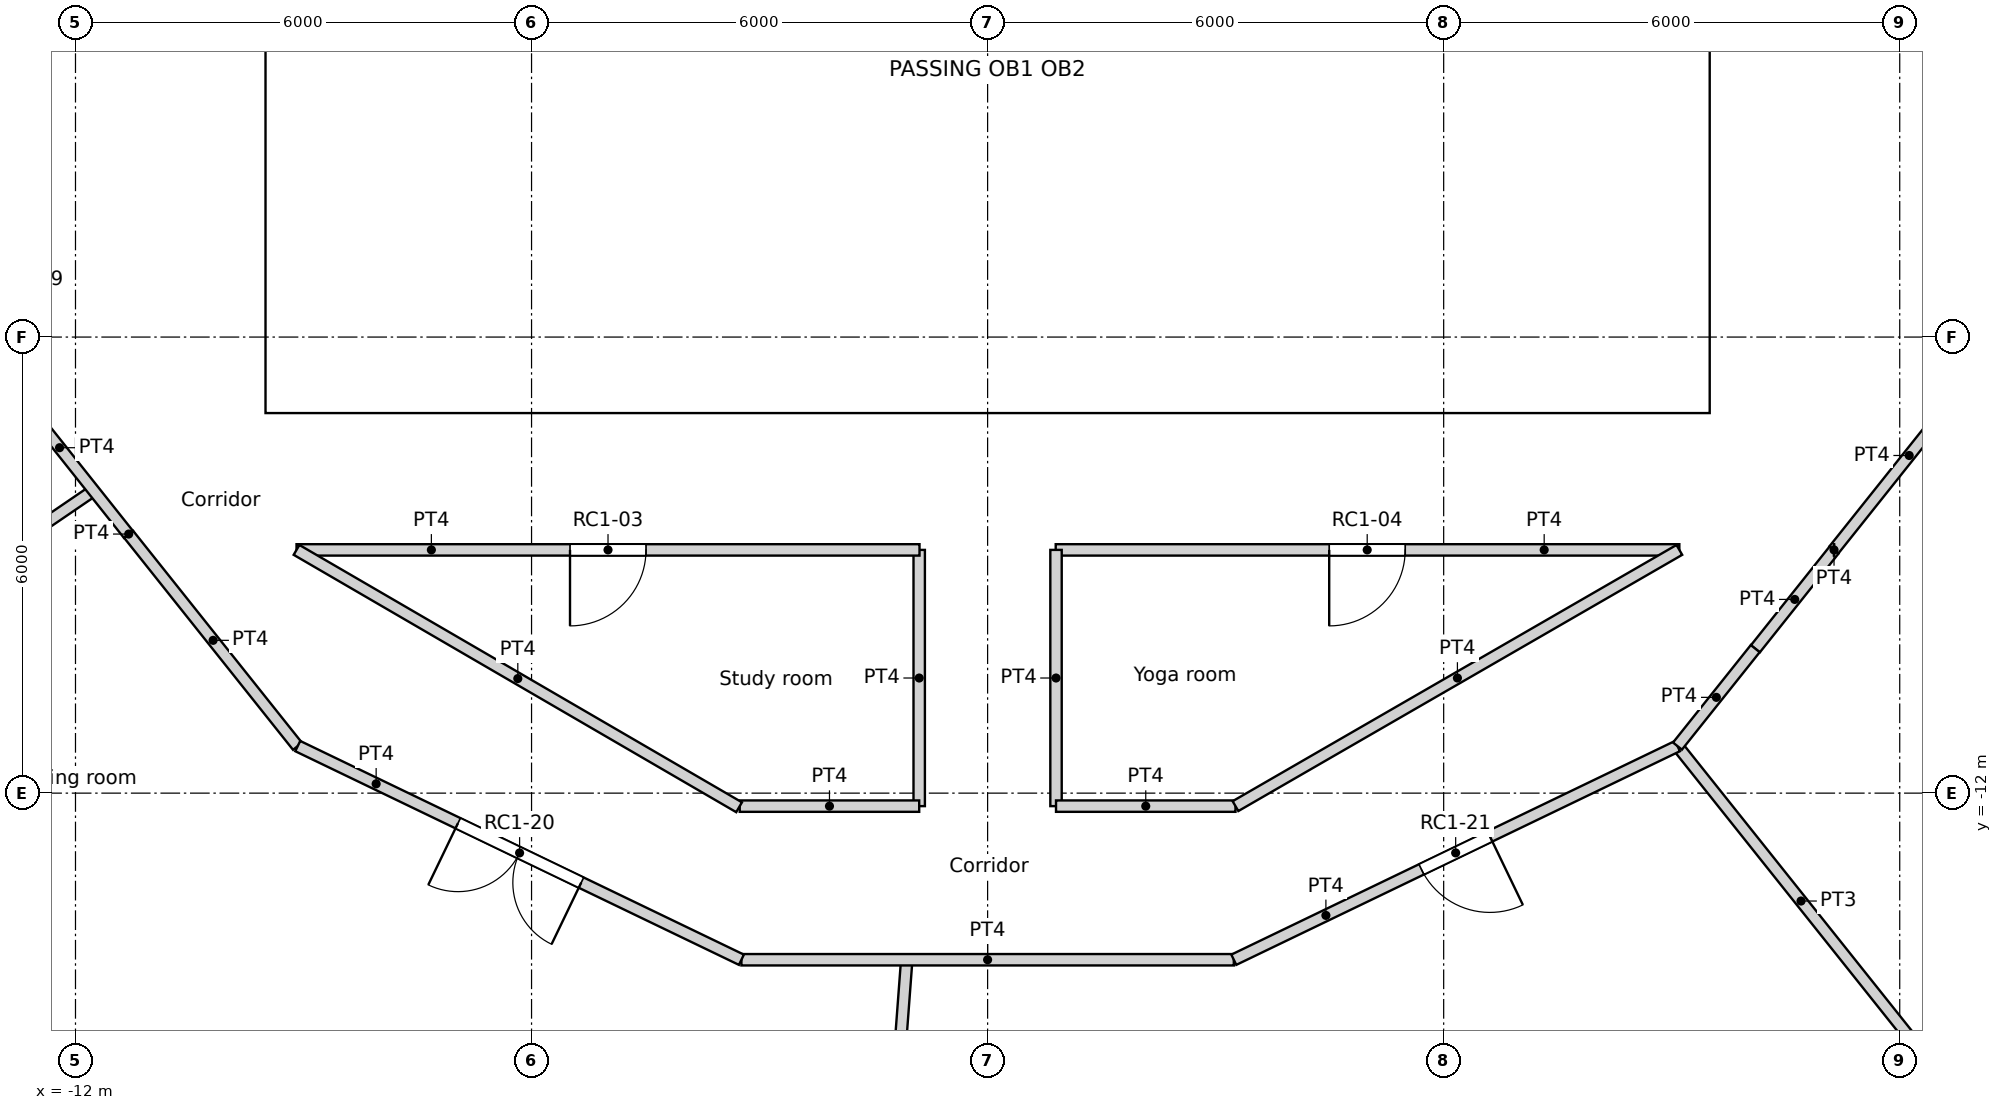
"""IFC4 building model, lengths in metres.
Left out: names, types, materials, properties, quantities, classifications, styles, units other than length and angle.
Written with IfcOpenShell. Run it as: python <this file> out.ifc"""

import sys

from ifc_helpers import new_model, si_unit, direction, frame, frame_2d, origin, origin_2d, place, context, subcontext, project, spatial, rectangle, circle, extrude, element, fill, save


model = new_model("IFC4")
c1 = context("Model", 3, precision=1e-05, world=origin(), true_north=direction((0.0, 1.0)))
c2 = subcontext(c1, "Body", "Model", "MODEL_VIEW")
j1 = project(units=[si_unit("LENGTHUNIT", "METRE"), si_unit("PLANEANGLEUNIT", "RADIAN")], contexts=[c1])
p1 = place(None, origin())
s1 = spatial("IfcSite", under=j1, at=p1, CompositionType="ELEMENT")
p2 = place(p1, origin())
s2 = spatial("IfcBuilding", under=s1, at=p2, CompositionType="ELEMENT")
p3 = place(p2, frame((0.0, 0.0, 231.0)))
s3 = spatial("IfcBuildingStorey", under=s2, at=p3, CompositionType="ELEMENT", Elevation=231.0)
p4 = place(p3, frame((11.735, -14.716, 0.0), z_axis=(0.0, 0.0, 1.0), x_axis=(1.0, 0.0, 0.0)))
e1 = element("IfcColumn", 1, at=p4, inside=s3, PredefinedType="COLUMN", context=c2, shape_type="SweptSolid", body=[
    extrude(circle(Radius=0.55, at=origin_2d()), origin(), (0.0, 0.0, 1.0), 3.6),
])
p5 = place(p3, frame((-9.5, -6.7, 0.0), z_axis=(0.0, 0.0, 1.0), x_axis=(1.0, 0.0, 0.0)))
e2 = element("IfcWall", 2, at=p5, inside=s3, PredefinedType="SOLIDWALL", context=c2, shape_type="SweptSolid", body=[
    extrude(rectangle(XDim=19.0, YDim=0.6, at=frame_2d((9.5, 0.0))), origin(), (0.0, 0.0, 1.0), 3.6),
])
p6 = place(p5, frame((10.4, 0.0, 0.0)))
e3 = element("IfcOpeningElement", 3, at=p6, cuts=e2, PredefinedType="OPENING", context=c2, shape_type="SweptSolid", body=[
    extrude(rectangle(XDim=1.0, YDim=2.1, at=frame_2d((0.5, 1.05))), frame((0.0, 0.3, 0.0), z_axis=(0.0, -1.0, 0.0), x_axis=(1.0, 0.0, 0.0)), (0.0, 0.0, 1.0), 0.6),
])
p7 = place(p5, frame((5.35, 0.0, 0.0)))
e4 = element("IfcOpeningElement", 4, at=p7, cuts=e2, PredefinedType="OPENING", context=c2, shape_type="SweptSolid", body=[
    extrude(rectangle(XDim=1.7, YDim=2.1, at=frame_2d((0.85, 1.05))), frame((0.0, 0.3, 0.0), z_axis=(0.0, -1.0, 0.0), x_axis=(1.0, 0.0, 0.0)), (0.0, 0.0, 1.0), 0.6),
])
p8 = place(p5, frame((11.95, 0.0, 0.0)))
e5 = element("IfcOpeningElement", 5, at=p8, cuts=e2, PredefinedType="OPENING", context=c2, shape_type="SweptSolid", body=[
    extrude(rectangle(XDim=1.7, YDim=2.1, at=frame_2d((0.85, 1.05))), frame((0.0, 0.3, 0.0), z_axis=(0.0, -1.0, 0.0), x_axis=(1.0, 0.0, 0.0)), (0.0, 0.0, 1.0), 0.6),
])
p9 = place(p3, frame((-9.2, -6.4, 0.0), z_axis=(0.0, 0.0, 1.0), x_axis=(0.0, 1.0, 0.0)))
e6 = element("IfcWall", 6, at=p9, inside=s3, PredefinedType="SOLIDWALL", context=c2, shape_type="SweptSolid", body=[
    extrude(rectangle(XDim=12.8, YDim=0.6, at=frame_2d((6.4, 0.0))), origin(), (0.0, 0.0, 1.0), 3.6),
])
p10 = place(p3, frame((9.2, -6.4, 0.0), z_axis=(0.0, 0.0, 1.0), x_axis=(0.0, 1.0, 0.0)))
e7 = element("IfcWall", 7, at=p10, inside=s3, PredefinedType="SOLIDWALL", context=c2, shape_type="SweptSolid", body=[
    extrude(rectangle(XDim=12.8, YDim=0.6, at=frame_2d((6.4, 0.0))), origin(), (0.0, 0.0, 1.0), 3.6),
])
p11 = place(p10, frame((6.4, 0.0, 0.0)))
e8 = element("IfcOpeningElement", 8, at=p11, cuts=e7, PredefinedType="OPENING", context=c2, shape_type="SweptSolid", body=[
    extrude(rectangle(XDim=1.8, YDim=2.1, at=frame_2d((0.9, 1.05))), frame((0.0, 0.3, 0.0), z_axis=(0.0, -1.0, 0.0), x_axis=(1.0, 0.0, 0.0)), (0.0, 0.0, 1.0), 0.6),
])
p12 = place(p3, frame((-8.9, -3.1, 0.0), z_axis=(0.0, 0.0, 1.0), x_axis=(1.0, 0.0, 0.0)))
e9 = element("IfcWall", 9, at=p12, inside=s3, PredefinedType="SOLIDWALL", context=c2, shape_type="SweptSolid", body=[
    extrude(rectangle(XDim=9.6, YDim=0.3, at=frame_2d((4.8, 0.0))), origin(), (0.0, 0.0, 1.0), 3.25),
])
p13 = place(p12, frame((4.75, 0.0, 0.0)))
e10 = element("IfcOpeningElement", 10, at=p13, cuts=e9, PredefinedType="OPENING", context=c2, shape_type="SweptSolid", body=[
    extrude(rectangle(XDim=1.7, YDim=2.1, at=frame_2d((0.85, 1.05))), frame((0.0, 0.15, 0.0), z_axis=(0.0, -1.0, 0.0), x_axis=(1.0, 0.0, 0.0)), (0.0, 0.0, 1.0), 0.3),
])
p14 = place(p3, frame((2.1, -3.1, 0.0), z_axis=(0.0, 0.0, 1.0), x_axis=(1.0, 0.0, 0.0)))
e11 = element("IfcWall", 11, at=p14, inside=s3, PredefinedType="SOLIDWALL", context=c2, shape_type="SweptSolid", body=[
    extrude(rectangle(XDim=6.8, YDim=0.3, at=frame_2d((3.4, 0.0))), origin(), (0.0, 0.0, 1.0), 3.25),
])
p15 = place(p14, frame((0.35, 0.0, 0.0)))
e12 = element("IfcOpeningElement", 12, at=p15, cuts=e11, PredefinedType="OPENING", context=c2, shape_type="SweptSolid", body=[
    extrude(rectangle(XDim=1.7, YDim=2.1, at=frame_2d((0.85, 1.05))), frame((0.0, 0.15, 0.0), z_axis=(0.0, -1.0, 0.0), x_axis=(1.0, 0.0, 0.0)), (0.0, 0.0, 1.0), 0.3),
])
p16 = place(p3, frame((-5.75, -2.95, 0.0), z_axis=(0.0, 0.0, 1.0), x_axis=(0.0, 1.0, 0.0)))
e13 = element("IfcWall", 13, at=p16, inside=s3, PredefinedType="SOLIDWALL", context=c2, shape_type="SweptSolid", body=[
    extrude(rectangle(XDim=5.9, YDim=0.3, at=frame_2d((2.95, 0.0))), origin(), (0.0, 0.0, 1.0), 3.25),
])
p17 = place(p16, frame((0.75, 0.0, 0.0)))
e14 = element("IfcOpeningElement", 14, at=p17, cuts=e13, PredefinedType="OPENING", context=c2, shape_type="SweptSolid", body=[
    extrude(rectangle(XDim=1.3, YDim=2.1, at=frame_2d((0.65, 1.05))), frame((0.0, 0.15, 0.0), z_axis=(0.0, -1.0, 0.0), x_axis=(1.0, 0.0, 0.0)), (0.0, 0.0, 1.0), 0.3),
])
p18 = place(p16, frame((3.85, 0.0, 0.0)))
e15 = element("IfcOpeningElement", 15, at=p18, cuts=e13, PredefinedType="OPENING", context=c2, shape_type="SweptSolid", body=[
    extrude(rectangle(XDim=1.3, YDim=2.1, at=frame_2d((0.65, 1.05))), frame((0.0, 0.15, 0.0), z_axis=(0.0, -1.0, 0.0), x_axis=(1.0, 0.0, 0.0)), (0.0, 0.0, 1.0), 0.3),
])
p19 = place(p3, frame((-2.25, -2.95, 0.0), z_axis=(0.0, 0.0, 1.0), x_axis=(0.0, 1.0, 0.0)))
e16 = element("IfcWall", 16, at=p19, inside=s3, PredefinedType="SOLIDWALL", context=c2, shape_type="SweptSolid", body=[
    extrude(rectangle(XDim=5.9, YDim=0.15, at=frame_2d((2.95, 0.0))), origin(), (0.0, 0.0, 1.0), 3.25),
])
p20 = place(p19, frame((2.25, 0.0, 0.0)))
e17 = element("IfcOpeningElement", 17, at=p20, cuts=e16, PredefinedType="OPENING", context=c2, shape_type="SweptSolid", body=[
    extrude(rectangle(XDim=1.4, YDim=2.1, at=frame_2d((0.7, 1.05))), frame((0.0, 0.075, 0.0), z_axis=(0.0, -1.0, 0.0), x_axis=(1.0, 0.0, 0.0)), (0.0, 0.0, 1.0), 0.15),
])
for number, where, z_axis, x_axis in (
    (18, (-2.25, -6.4, 0.0), (0.0, 0.0, 1.0), (0.0, 1.0, 0.0)),
    (19, (0.55, -6.4, 0.0), (0.0, 0.0, 1.0), (0.0, 1.0, 0.0)),
    (20, (2.25, -6.4, 0.0), (0.0, 0.0, 1.0), (0.0, 1.0, 0.0)),
):
    element("IfcWall", number, at=place(p3, frame(where, z_axis=z_axis, x_axis=x_axis)), inside=s3, PredefinedType="SOLIDWALL", context=c2, shape_type="SweptSolid", body=[
        extrude(rectangle(XDim=3.15, YDim=0.3, at=frame_2d((1.575, 0.0))), origin(), (0.0, 0.0, 1.0), 3.25),
    ])
for number, where, z_axis, x_axis in (
    (21, (4.3, -2.95, 0.0), (0.0, 0.0, 1.0), (0.0, 1.0, 0.0)),
    (22, (5.675, -2.95, 0.0), (0.0, 0.0, 1.0), (0.0, 1.0, 0.0)),
    (23, (7.125, -2.95, 0.0), (0.0, 0.0, 1.0), (0.0, 1.0, 0.0)),
):
    element("IfcWall", number, at=place(p3, frame(where, z_axis=z_axis, x_axis=x_axis)), inside=s3, PredefinedType="SOLIDWALL", context=c2, shape_type="SweptSolid", body=[
        extrude(rectangle(XDim=2.45, YDim=0.15, at=frame_2d((1.225, 0.0))), origin(), (0.0, 0.0, 1.0), 3.25),
    ])
p21 = place(p3, frame((-9.092, -8.8, 0.0), z_axis=(0.0, 0.0, 1.0), x_axis=(1.0, 0.0, 0.0)))
e24 = element("IfcWall", 24, at=p21, inside=s3, PredefinedType="PARTITIONING", context=c2, shape_type="SweptSolid", body=[
    extrude(rectangle(XDim=8.196, YDim=0.15, at=frame_2d((4.098, 0.0))), origin(), (0.0, 0.0, 1.0), 3.25),
])
p22 = place(p21, frame((3.598, 0.0, 0.0)))
e25 = element("IfcOpeningElement", 25, at=p22, cuts=e24, PredefinedType="OPENING", context=c2, shape_type="SweptSolid", body=[
    extrude(rectangle(XDim=1.0, YDim=2.04, at=frame_2d((0.5, 1.02))), frame((0.0, 0.075, 0.0), z_axis=(0.0, -1.0, 0.0), x_axis=(1.0, 0.0, 0.0)), (0.0, 0.0, 1.0), 0.15),
])
p23 = place(p3, frame((-9.092, -8.8, 0.0), z_axis=(0.0, 0.0, 1.0), x_axis=(0.864470922103, -0.502682827277, 0.0)))
e26 = element("IfcWall", 26, at=p23, inside=s3, PredefinedType="PARTITIONING", context=c2, shape_type="SweptSolid", body=[
    extrude(rectangle(XDim=6.735, YDim=0.15, at=frame_2d((3.368, 0.0))), origin(), (0.0, 0.0, 1.0), 3.25),
])
p24 = place(p3, frame((0.896, -8.8, 0.0), z_axis=(0.0, 0.0, 1.0), x_axis=(1.0, 0.0, 0.0)))
e27 = element("IfcWall", 27, at=p24, inside=s3, PredefinedType="PARTITIONING", context=c2, shape_type="SweptSolid", body=[
    extrude(rectangle(XDim=8.205, YDim=0.15, at=frame_2d((4.102, 0.0))), origin(), (0.0, 0.0, 1.0), 3.25),
])
p25 = place(p24, frame((3.598, 0.0, 0.0)))
e28 = element("IfcOpeningElement", 28, at=p25, cuts=e27, PredefinedType="OPENING", context=c2, shape_type="SweptSolid", body=[
    extrude(rectangle(XDim=1.0, YDim=2.04, at=frame_2d((0.5, 1.02))), frame((0.0, 0.075, 0.0), z_axis=(0.0, -1.0, 0.0), x_axis=(1.0, 0.0, 0.0)), (0.0, 0.0, 1.0), 0.15),
])
p26 = place(p3, frame((-11.3, -8.596, 0.0), z_axis=(0.0, 0.0, 1.0), x_axis=(0.623165080354, -0.782090328944, 0.0)))
e29 = element("IfcWall", 29, at=p26, inside=s3, PredefinedType="PARTITIONING", context=c2, shape_type="SweptSolid", body=[
    extrude(rectangle(XDim=3.564, YDim=0.15, at=frame_2d((1.782, 0.0))), origin(), (0.0, 0.0, 1.0), 3.25),
])
p27 = place(p3, frame((-11.3, -8.596, 0.0), z_axis=(0.0, 0.0, 1.0), x_axis=(0.0, 1.0, 0.0)))
e30 = element("IfcWall", 30, at=p27, inside=s3, PredefinedType="PARTITIONING", context=c2, shape_type="SweptSolid", body=[
    extrude(rectangle(XDim=0.009, YDim=0.15, at=frame_2d((0.005, 0.0))), origin(), (0.0, 0.0, 1.0), 3.25),
])
p28 = place(p3, frame((11.137, -8.8, 0.0), z_axis=(0.0, 0.0, 1.0), x_axis=(-1.0, 0.0, 0.0)))
e31 = element("IfcWall", 31, at=p28, inside=s3, PredefinedType="PARTITIONING", context=c2, shape_type="SweptSolid", body=[
    extrude(rectangle(XDim=0.003, YDim=0.15, at=frame_2d((0.001, 0.0))), origin(), (0.0, 0.0, 1.0), 3.25),
])
p29 = place(p3, frame((10.101, -10.101, 0.0), z_axis=(0.0, 0.0, 1.0), x_axis=(0.623098344652, 0.782143498913, 0.0)))
e32 = element("IfcWall", 32, at=p29, inside=s3, PredefinedType="PARTITIONING", context=c2, shape_type="SweptSolid", body=[
    extrude(rectangle(XDim=1.661, YDim=0.15, at=frame_2d((0.831, 0.0))), origin(), (0.0, 0.0, 1.0), 3.25),
])
p30 = place(p3, frame((11.134, -8.8, 0.0), z_axis=(0.0, 0.0, 1.0), x_axis=(0.623476099415, 0.781842409606, 0.0)))
e33 = element("IfcWall", 33, at=p30, inside=s3, PredefinedType="PARTITIONING", context=c2, shape_type="SweptSolid", body=[
    extrude(rectangle(XDim=3.177, YDim=0.15, at=frame_2d((1.589, 0.0))), origin(), (0.0, 0.0, 1.0), 3.25),
])
p31 = place(p3, frame((-13.115, -6.316, 0.0), z_axis=(0.0, 0.0, 1.0), x_axis=(0.622042479172, -0.782983495423, 0.0)))
e34 = element("IfcWall", 34, at=p31, inside=s3, PredefinedType="PARTITIONING", context=c2, shape_type="SweptSolid", body=[
    extrude(rectangle(XDim=2.911, YDim=0.15, at=frame_2d((1.456, 0.0))), origin(), (0.0, 0.0, 1.0), 3.25),
])
p32 = place(p3, frame((-3.261, -12.171, 0.0), z_axis=(0.0, 0.0, 1.0), x_axis=(1.0, 0.0, 0.0)))
e35 = element("IfcWall", 35, at=p32, inside=s3, PredefinedType="PARTITIONING", context=c2, shape_type="SweptSolid", body=[
    extrude(rectangle(XDim=2.361, YDim=0.15, at=frame_2d((1.181, 0.0))), origin(), (0.0, 0.0, 1.0), 3.25),
])
for number, where, z_axis, x_axis in (
    (36, (-0.9, -12.171, 0.0), (0.0, 0.0, 1.0), (0.0, 1.0, 0.0)),
    (37, (0.9, -12.171, 0.0), (0.0, 0.0, 1.0), (0.0, 1.0, 0.0)),
):
    element("IfcWall", number, at=place(p3, frame(where, z_axis=z_axis, x_axis=x_axis)), inside=s3, PredefinedType="PARTITIONING", context=c2, shape_type="SweptSolid", body=[
        extrude(rectangle(XDim=3.371, YDim=0.15, at=frame_2d((1.686, 0.0))), origin(), (0.0, 0.0, 1.0), 3.25),
    ])
p33 = place(p3, frame((0.9, -12.171, 0.0), z_axis=(0.0, 0.0, 1.0), x_axis=(1.0, 0.0, 0.0)))
e38 = element("IfcWall", 38, at=p33, inside=s3, PredefinedType="PARTITIONING", context=c2, shape_type="SweptSolid", body=[
    extrude(rectangle(XDim=2.361, YDim=0.15, at=frame_2d((1.181, 0.0))), origin(), (0.0, 0.0, 1.0), 3.25),
])
p34 = place(p3, frame((3.261, -12.171, 0.0), z_axis=(0.0, 0.0, 1.0), x_axis=(0.866066809554, 0.499928276245, 0.0)))
e39 = element("IfcWall", 39, at=p34, inside=s3, PredefinedType="PARTITIONING", context=c2, shape_type="SweptSolid", body=[
    extrude(rectangle(XDim=6.743, YDim=0.15, at=frame_2d((3.371, 0.0))), origin(), (0.0, 0.0, 1.0), 3.25),
])
p35 = place(p3, frame((-3.239, -14.192, 0.0), z_axis=(0.0, 0.0, 1.0), x_axis=(1.0, 0.0, 0.0)))
e40 = element("IfcWall", 40, at=p35, inside=s3, PredefinedType="PARTITIONING", context=c2, shape_type="SweptSolid", body=[
    extrude(rectangle(XDim=6.478, YDim=0.15, at=frame_2d((3.239, 0.0))), origin(), (0.0, 0.0, 1.0), 3.25),
])
p36 = place(p3, frame((-9.076, -11.381, 0.0), z_axis=(0.0, 0.0, 1.0), x_axis=(0.900976027191, -0.433868872388, 0.0)))
e41 = element("IfcWall", 41, at=p36, inside=s3, PredefinedType="PARTITIONING", context=c2, shape_type="SweptSolid", body=[
    extrude(rectangle(XDim=6.479, YDim=0.15, at=frame_2d((3.239, 0.0))), origin(), (0.0, 0.0, 1.0), 3.25),
])
p37 = place(p36, frame((2.34, 0.0, 0.0)))
e42 = element("IfcOpeningElement", 42, at=p37, cuts=e41, PredefinedType="OPENING", context=c2, shape_type="SweptSolid", body=[
    extrude(rectangle(XDim=1.8, YDim=2.1, at=frame_2d((0.9, 1.05))), frame((0.0, 0.075, 0.0), z_axis=(0.0, -1.0, 0.0), x_axis=(1.0, 0.0, 0.0)), (0.0, 0.0, 1.0), 0.15),
])
p38 = place(p3, frame((3.239, -14.192, 0.0), z_axis=(0.0, 0.0, 1.0), x_axis=(0.900976027191, 0.433868872388, 0.0)))
e43 = element("IfcWall", 43, at=p38, inside=s3, PredefinedType="PARTITIONING", context=c2, shape_type="SweptSolid", body=[
    extrude(rectangle(XDim=6.479, YDim=0.15, at=frame_2d((3.239, 0.0))), origin(), (0.0, 0.0, 1.0), 3.25),
])
p39 = place(p38, frame((2.74, 0.0, 0.0)))
e44 = element("IfcOpeningElement", 44, at=p39, cuts=e43, PredefinedType="OPENING", context=c2, shape_type="SweptSolid", body=[
    extrude(rectangle(XDim=1.0, YDim=2.04, at=frame_2d((0.5, 1.02))), frame((0.0, 0.075, 0.0), z_axis=(0.0, -1.0, 0.0), x_axis=(1.0, 0.0, 0.0)), (0.0, 0.0, 1.0), 0.15),
])
p40 = place(p3, frame((9.076, -11.381, 0.0), z_axis=(0.0, 0.0, 1.0), x_axis=(0.623805208652, 0.781579849829, 0.0)))
e45 = element("IfcWall", 45, at=p40, inside=s3, PredefinedType="PARTITIONING", context=c2, shape_type="SweptSolid", body=[
    extrude(rectangle(XDim=1.64, YDim=0.15, at=frame_2d((0.82, 0.0))), origin(), (0.0, 0.0, 1.0), 3.25),
])
p41 = place(p3, frame((-16.336, -11.138, 0.0), z_axis=(0.0, 0.0, 1.0), x_axis=(0.82615274451, 0.563446219917, 0.0)))
e46 = element("IfcWall", 46, at=p41, inside=s3, PredefinedType="PARTITIONING", context=c2, shape_type="SweptSolid", body=[
    extrude(rectangle(XDim=5.54, YDim=0.15, at=frame_2d((2.77, 0.0))), origin(), (0.0, 0.0, 1.0), 3.25),
])
p42 = place(p3, frame((-1.478, -19.716, 0.0), z_axis=(0.0, 0.0, 1.0), x_axis=(0.074745027699, 0.997202677912, 0.0)))
e47 = element("IfcWall", 47, at=p42, inside=s3, PredefinedType="PARTITIONING", context=c2, shape_type="SweptSolid", body=[
    extrude(rectangle(XDim=5.54, YDim=0.15, at=frame_2d((2.77, 0.0))), origin(), (0.0, 0.0, 1.0), 3.25),
])
p43 = place(p3, frame((9.076, -11.381, 0.0), z_axis=(0.0, 0.0, 1.0), x_axis=(0.623460949534, -0.781854490558, 0.0)))
e48 = element("IfcWall", 48, at=p43, inside=s3, PredefinedType="PARTITIONING", context=c2, shape_type="SweptSolid", body=[
    extrude(rectangle(XDim=5.214, YDim=0.15, at=frame_2d((2.607, 0.0))), origin(), (0.0, 0.0, 1.0), 3.25),
])
p44 = place(p13, origin())
e49 = element("IfcDoor", 49, at=p44, inside=s3, OperationType="DOUBLE_DOOR_SINGLE_SWING", PredefinedType="DOOR", context=c2, shape_type="SweptSolid", body=[
    extrude(rectangle(XDim=1.7, YDim=2.1, at=frame_2d((0.85, 1.05))), frame((0.0, 0.025, 0.0), z_axis=(0.0, -1.0, 0.0), x_axis=(1.0, 0.0, 0.0)), (0.0, 0.0, 1.0), 0.05),
])
fill(e10, e49)
p45 = place(p15, origin())
e50 = element("IfcDoor", 50, at=p45, inside=s3, OperationType="DOUBLE_DOOR_SINGLE_SWING", PredefinedType="DOOR", context=c2, shape_type="SweptSolid", body=[
    extrude(rectangle(XDim=1.7, YDim=2.1, at=frame_2d((0.85, 1.05))), frame((0.0, 0.025, 0.0), z_axis=(0.0, -1.0, 0.0), x_axis=(1.0, 0.0, 0.0)), (0.0, 0.0, 1.0), 0.05),
])
fill(e12, e50)
p46 = place(p6, origin())
e51 = element("IfcDoor", 51, at=p46, inside=s3, OperationType="SINGLE_SWING_LEFT", PredefinedType="DOOR", context=c2, shape_type="SweptSolid", body=[
    extrude(rectangle(XDim=1.0, YDim=2.1, at=frame_2d((0.5, 1.05))), frame((0.0, 0.025, 0.0), z_axis=(0.0, -1.0, 0.0), x_axis=(1.0, 0.0, 0.0)), (0.0, 0.0, 1.0), 0.05),
])
fill(e3, e51)
p47 = place(p7, origin())
e52 = element("IfcDoor", 52, at=p47, inside=s3, OperationType="DOUBLE_DOOR_SINGLE_SWING", PredefinedType="DOOR", context=c2, shape_type="SweptSolid", body=[
    extrude(rectangle(XDim=1.7, YDim=2.1, at=frame_2d((0.85, 1.05))), frame((0.0, 0.025, 0.0), z_axis=(0.0, -1.0, 0.0), x_axis=(1.0, 0.0, 0.0)), (0.0, 0.0, 1.0), 0.05),
])
fill(e4, e52)
p48 = place(p8, origin())
e53 = element("IfcDoor", 53, at=p48, inside=s3, OperationType="DOUBLE_DOOR_SINGLE_SWING", PredefinedType="DOOR", context=c2, shape_type="SweptSolid", body=[
    extrude(rectangle(XDim=1.7, YDim=2.1, at=frame_2d((0.85, 1.05))), frame((0.0, 0.025, 0.0), z_axis=(0.0, -1.0, 0.0), x_axis=(1.0, 0.0, 0.0)), (0.0, 0.0, 1.0), 0.05),
])
fill(e5, e53)
p49 = place(p22, origin())
e54 = element("IfcDoor", 54, at=p49, inside=s3, OperationType="SINGLE_SWING_RIGHT", PredefinedType="DOOR", context=c2, shape_type="SweptSolid", body=[
    extrude(rectangle(XDim=1.0, YDim=2.04, at=frame_2d((0.5, 1.02))), frame((0.0, 0.025, 0.0), z_axis=(0.0, -1.0, 0.0), x_axis=(1.0, 0.0, 0.0)), (0.0, 0.0, 1.0), 0.05),
])
fill(e25, e54)
p50 = place(p25, origin())
e55 = element("IfcDoor", 55, at=p50, inside=s3, OperationType="SINGLE_SWING_RIGHT", PredefinedType="DOOR", context=c2, shape_type="SweptSolid", body=[
    extrude(rectangle(XDim=1.0, YDim=2.04, at=frame_2d((0.5, 1.02))), frame((0.0, 0.025, 0.0), z_axis=(0.0, -1.0, 0.0), x_axis=(1.0, 0.0, 0.0)), (0.0, 0.0, 1.0), 0.05),
])
fill(e28, e55)
p51 = place(p37, origin())
e56 = element("IfcDoor", 56, at=p51, inside=s3, OperationType="DOUBLE_DOOR_SINGLE_SWING", PredefinedType="DOOR", context=c2, shape_type="SweptSolid", body=[
    extrude(rectangle(XDim=1.8, YDim=2.1, at=frame_2d((0.9, 1.05))), frame((0.0, 0.025, 0.0), z_axis=(0.0, -1.0, 0.0), x_axis=(1.0, 0.0, 0.0)), (0.0, 0.0, 1.0), 0.05),
])
fill(e42, e56)
p52 = place(p39, origin())
e57 = element("IfcDoor", 57, at=p52, inside=s3, OperationType="SINGLE_SWING_LEFT", PredefinedType="DOOR", context=c2, shape_type="SweptSolid", body=[
    extrude(rectangle(XDim=1.0, YDim=2.04, at=frame_2d((0.5, 1.02))), frame((0.0, 0.025, 0.0), z_axis=(0.0, -1.0, 0.0), x_axis=(1.0, 0.0, 0.0)), (0.0, 0.0, 1.0), 0.05),
])
fill(e44, e57)
save(model, sys.argv[1])
